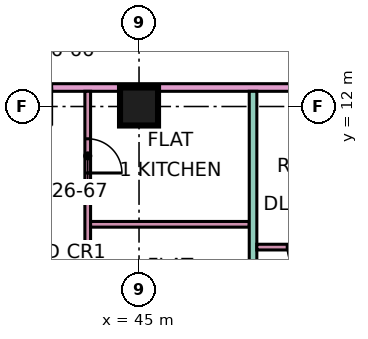
"""IFC4 building model, lengths in metres.
Left out: names, types, materials, properties, quantities, classifications, styles, units other than length and angle.
Written with IfcOpenShell. Run it as: python <this file> out.ifc"""

import sys

from ifc_helpers import new_model, si_unit, direction, frame, frame_2d, origin, origin_2d, place, context, subcontext, project, spatial, rectangle, extrude, element, fill, save


model = new_model("IFC4")
c1 = context("Model", 3, precision=1e-05, world=origin(), true_north=direction((0.0, 1.0)))
c2 = subcontext(c1, "Body", "Model", "MODEL_VIEW")
j1 = project(units=[si_unit("LENGTHUNIT", "METRE"), si_unit("PLANEANGLEUNIT", "RADIAN")], contexts=[c1])
p1 = place(None, origin())
s1 = spatial("IfcSite", under=j1, at=p1, CompositionType="ELEMENT")
p2 = place(p1, origin())
s2 = spatial("IfcBuilding", under=s1, at=p2, CompositionType="ELEMENT")
p3 = place(p2, frame((0.0, 0.0, 114.4)))
s3 = spatial("IfcBuildingStorey", under=s2, at=p3, CompositionType="ELEMENT", Elevation=114.4)
p4 = place(p3, frame((45.0, 12.0, 0.0), z_axis=(0.0, 0.0, 1.0), x_axis=(1.0, 0.0, 0.0)))
e1 = element("IfcColumn", 1, at=p4, inside=s3, PredefinedType="COLUMN", context=c2, shape_type="SweptSolid", body=[
    extrude(rectangle(XDim=1.0, YDim=1.0, at=origin_2d()), origin(), (0.0, 0.0, 1.0), 3.75),
])
p5 = place(p3, frame((40.65, 12.5, 0.0), z_axis=(0.0, 0.0, 1.0), x_axis=(1.0, 0.0, 0.0)))
e2 = element("IfcWall", 2, at=p5, inside=s3, PredefinedType="PARTITIONING", context=c2, shape_type="SweptSolid", body=[
    extrude(rectangle(XDim=31.276, YDim=0.2, at=frame_2d((15.638, 0.0))), origin(), (0.0, 0.0, 1.0), 3.35),
])
p6 = place(p5, frame((20.7, 0.0, 0.0)))
e3 = element("IfcOpeningElement", 3, at=p6, cuts=e2, PredefinedType="OPENING", context=c2, shape_type="SweptSolid", body=[
    extrude(rectangle(XDim=1.0, YDim=2.1, at=frame_2d((0.5, 1.05))), frame((0.0, 0.11, 0.0), z_axis=(0.0, -1.0, 0.0), x_axis=(1.0, 0.0, 0.0)), (0.0, 0.0, 1.0), 0.22),
])
p7 = place(p5, frame((1.05, 0.0, 0.0)))
e4 = element("IfcOpeningElement", 4, at=p7, cuts=e2, PredefinedType="OPENING", context=c2, shape_type="SweptSolid", body=[
    extrude(rectangle(XDim=1.0, YDim=2.1, at=frame_2d((0.5, 1.05))), frame((0.0, 0.11, 0.0), z_axis=(0.0, -1.0, 0.0), x_axis=(1.0, 0.0, 0.0)), (0.0, 0.0, 1.0), 0.22),
])
p8 = place(p3, frame((43.65, 5.825, 0.0), z_axis=(0.0, 0.0, 1.0), x_axis=(0.0, 1.0, 0.0)))
e5 = element("IfcWall", 5, at=p8, inside=s3, PredefinedType="PARTITIONING", context=c2, shape_type="SweptSolid", body=[
    extrude(rectangle(XDim=6.575, YDim=0.15, at=frame_2d((3.288, 0.0))), origin(), (0.0, 0.0, 1.0), 3.35),
])
p9 = place(p8, frame((4.425, 0.0, 0.0)))
e6 = element("IfcOpeningElement", 6, at=p9, cuts=e5, PredefinedType="OPENING", context=c2, shape_type="SweptSolid", body=[
    extrude(rectangle(XDim=0.9, YDim=2.1, at=frame_2d((0.45, 1.05))), frame((0.0, 0.085, 0.0), z_axis=(0.0, -1.0, 0.0), x_axis=(1.0, 0.0, 0.0)), (0.0, 0.0, 1.0), 0.17),
])
p10 = place(p3, frame((43.725, 8.9, 0.0), z_axis=(0.0, 0.0, 1.0), x_axis=(1.0, 0.0, 0.0)))
e7 = element("IfcWall", 7, at=p10, inside=s3, PredefinedType="PARTITIONING", context=c2, shape_type="SweptSolid", body=[
    extrude(rectangle(XDim=4.175, YDim=0.15, at=frame_2d((2.087, 0.0))), origin(), (0.0, 0.0, 1.0), 3.35),
])
p11 = place(p3, frame((48.0, 0.0, 0.0), z_axis=(0.0, 0.0, 1.0), x_axis=(0.0, 1.0, 0.0)))
e8 = element("IfcWall", 8, at=p11, inside=s3, PredefinedType="PARTITIONING", context=c2, shape_type="SweptSolid", body=[
    extrude(rectangle(XDim=12.4, YDim=0.2, at=frame_2d((6.2, 0.0))), origin(), (0.0, 0.0, 1.0), 3.35),
])
p12 = place(p3, frame((48.1, 8.3, 0.0), z_axis=(0.0, 0.0, 1.0), x_axis=(1.0, 0.0, 0.0)))
e9 = element("IfcWall", 9, at=p12, inside=s3, PredefinedType="PARTITIONING", context=c2, shape_type="SweptSolid", body=[
    extrude(rectangle(XDim=12.575, YDim=0.15, at=frame_2d((6.288, 0.0))), origin(), (0.0, 0.0, 1.0), 3.35),
])
p13 = place(p12, frame((3.75, 0.0, 0.0)))
e10 = element("IfcOpeningElement", 10, at=p13, cuts=e9, PredefinedType="OPENING", context=c2, shape_type="SweptSolid", body=[
    extrude(rectangle(XDim=0.8, YDim=2.1, at=frame_2d((0.4, 1.05))), frame((0.0, 0.085, 0.0), z_axis=(0.0, -1.0, 0.0), x_axis=(1.0, 0.0, 0.0)), (0.0, 0.0, 1.0), 0.17),
])
p14 = place(p12, frame((0.8, 0.0, 0.0)))
e11 = element("IfcOpeningElement", 11, at=p14, cuts=e9, PredefinedType="OPENING", context=c2, shape_type="SweptSolid", body=[
    extrude(rectangle(XDim=0.9, YDim=2.1, at=frame_2d((0.45, 1.05))), frame((0.0, 0.085, 0.0), z_axis=(0.0, -1.0, 0.0), x_axis=(1.0, 0.0, 0.0)), (0.0, 0.0, 1.0), 0.17),
])
p15 = place(p12, frame((6.75, 0.0, 0.0)))
e12 = element("IfcOpeningElement", 12, at=p15, cuts=e9, PredefinedType="OPENING", context=c2, shape_type="SweptSolid", body=[
    extrude(rectangle(XDim=0.8, YDim=2.1, at=frame_2d((0.4, 1.05))), frame((0.0, 0.085, 0.0), z_axis=(0.0, -1.0, 0.0), x_axis=(1.0, 0.0, 0.0)), (0.0, 0.0, 1.0), 0.17),
])
p16 = place(p12, frame((10.2, 0.0, 0.0)))
e13 = element("IfcOpeningElement", 13, at=p16, cuts=e9, PredefinedType="OPENING", context=c2, shape_type="SweptSolid", body=[
    extrude(rectangle(XDim=0.8, YDim=2.1, at=frame_2d((0.4, 1.05))), frame((0.0, 0.085, 0.0), z_axis=(0.0, -1.0, 0.0), x_axis=(1.0, 0.0, 0.0)), (0.0, 0.0, 1.0), 0.17),
])
p17 = place(p14, origin())
e14 = element("IfcDoor", 14, at=p17, inside=s3, OperationType="SINGLE_SWING_RIGHT", PredefinedType="DOOR", context=c2, shape_type="SweptSolid", body=[
    extrude(rectangle(XDim=0.9, YDim=2.1, at=frame_2d((0.45, 1.05))), frame((0.0, 0.025, 0.0), z_axis=(0.0, -1.0, 0.0), x_axis=(1.0, 0.0, 0.0)), (0.0, 0.0, 1.0), 0.05),
])
fill(e11, e14)
p18 = place(p9, frame((0.9, 0.0, 0.0), z_axis=(0.0, 0.0, 1.0), x_axis=(-1.0, 0.0, 0.0)))
e15 = element("IfcDoor", 15, at=p18, inside=s3, OperationType="SINGLE_SWING_LEFT", PredefinedType="DOOR", context=c2, shape_type="SweptSolid", body=[
    extrude(rectangle(XDim=0.9, YDim=2.1, at=frame_2d((0.45, 1.05))), frame((0.0, 0.025, 0.0), z_axis=(0.0, -1.0, 0.0), x_axis=(1.0, 0.0, 0.0)), (0.0, 0.0, 1.0), 0.05),
])
fill(e6, e15)
save(model, sys.argv[1])
